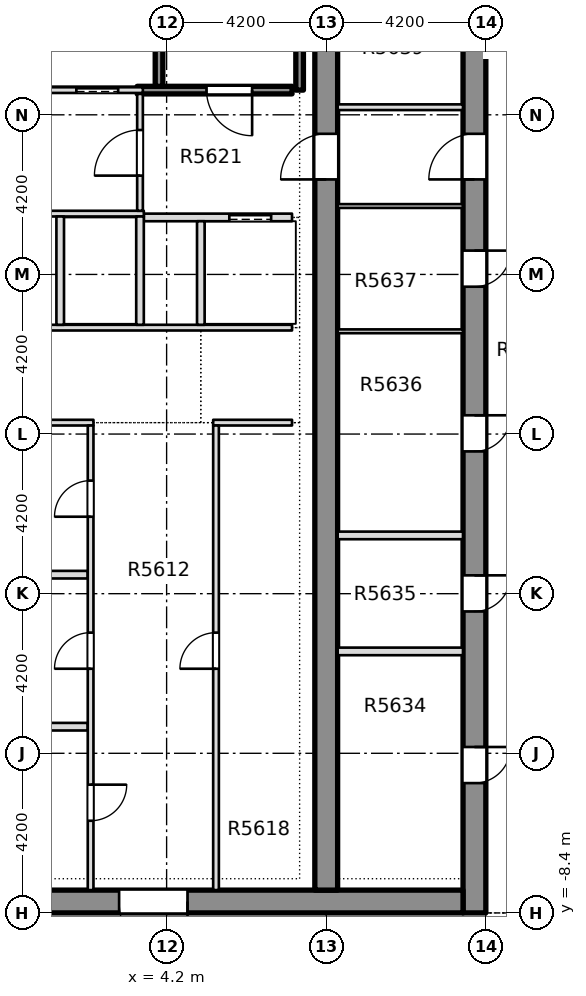
"""IFC4 building model, lengths in metres.
Left out: names, types, materials, properties, quantities, classifications, styles, units other than length and angle.
Written with IfcOpenShell. Run it as: python <this file> out.ifc"""

import sys

from ifc_helpers import new_model, si_unit, direction, frame, frame_2d, origin, place, context, subcontext, project, spatial, rectangle, extrude, element, fill, save


model = new_model("IFC4")
c1 = context("Model", 3, precision=1e-05, world=origin(), true_north=direction((0.0, 1.0)))
c2 = subcontext(c1, "Body", "Model", "MODEL_VIEW")
j1 = project(units=[si_unit("LENGTHUNIT", "METRE"), si_unit("PLANEANGLEUNIT", "RADIAN")], contexts=[c1])
p1 = place(None, origin())
s1 = spatial("IfcSite", under=j1, at=p1, CompositionType="ELEMENT")
p2 = place(p1, origin())
s2 = spatial("IfcBuilding", under=s1, at=p2, CompositionType="ELEMENT")
p3 = place(p2, frame((0.0, 0.0, 213.5)))
s3 = spatial("IfcBuildingStorey", under=s2, at=p3, CompositionType="ELEMENT", Elevation=213.5)
p4 = place(p3, frame((12.3, -8.4, -0.4), z_axis=(0.0, 0.0, 1.0), x_axis=(0.0, 1.0, 0.0)))
e1 = element("IfcWall", 1, at=p4, inside=s3, PredefinedType="SHEAR", context=c2, shape_type="SweptSolid", body=[
    extrude(rectangle(XDim=30.15, YDim=0.6, at=frame_2d((15.075, 0.0))), origin(), (0.0, 0.0, 1.0), 3.4),
])
p5 = place(p4, frame((3.416, 0.0, 0.4)))
e2 = element("IfcOpeningElement", 2, at=p5, cuts=e1, PredefinedType="OPENING", context=c2, shape_type="SweptSolid", body=[
    extrude(rectangle(XDim=0.95, YDim=2.1, at=frame_2d((0.475, 1.05))), frame((0.0, 0.31, 0.0), z_axis=(0.0, -1.0, 0.0), x_axis=(1.0, 0.0, 0.0)), (0.0, 0.0, 1.0), 0.62),
])
p6 = place(p4, frame((7.932, 0.0, 0.4)))
e3 = element("IfcOpeningElement", 3, at=p6, cuts=e1, PredefinedType="OPENING", context=c2, shape_type="SweptSolid", body=[
    extrude(rectangle(XDim=0.95, YDim=2.1, at=frame_2d((0.475, 1.05))), frame((0.0, 0.31, 0.0), z_axis=(0.0, -1.0, 0.0), x_axis=(1.0, 0.0, 0.0)), (0.0, 0.0, 1.0), 0.62),
])
p7 = place(p4, frame((12.144, 0.0, 0.4)))
e4 = element("IfcOpeningElement", 4, at=p7, cuts=e1, PredefinedType="OPENING", context=c2, shape_type="SweptSolid", body=[
    extrude(rectangle(XDim=0.95, YDim=2.1, at=frame_2d((0.475, 1.05))), frame((0.0, 0.31, 0.0), z_axis=(0.0, -1.0, 0.0), x_axis=(1.0, 0.0, 0.0)), (0.0, 0.0, 1.0), 0.62),
])
p8 = place(p4, frame((16.477, 0.0, 0.4)))
e5 = element("IfcOpeningElement", 5, at=p8, cuts=e1, PredefinedType="OPENING", context=c2, shape_type="SweptSolid", body=[
    extrude(rectangle(XDim=0.95, YDim=2.1, at=frame_2d((0.475, 1.05))), frame((0.0, 0.31, 0.0), z_axis=(0.0, -1.0, 0.0), x_axis=(1.0, 0.0, 0.0)), (0.0, 0.0, 1.0), 0.62),
])
p9 = place(p4, frame((23.605, 0.0, 0.4)))
e6 = element("IfcOpeningElement", 6, at=p9, cuts=e1, PredefinedType="OPENING", context=c2, shape_type="SweptSolid", body=[
    extrude(rectangle(XDim=0.95, YDim=2.1, at=frame_2d((0.475, 1.05))), frame((0.0, 0.31, 0.0), z_axis=(0.0, -1.0, 0.0), x_axis=(1.0, 0.0, 0.0)), (0.0, 0.0, 1.0), 0.62),
])
p10 = place(p4, frame((27.63, 0.0, 0.4)))
e7 = element("IfcOpeningElement", 7, at=p10, cuts=e1, PredefinedType="OPENING", context=c2, shape_type="SweptSolid", body=[
    extrude(rectangle(XDim=0.95, YDim=2.1, at=frame_2d((0.475, 1.05))), frame((0.0, 0.31, 0.0), z_axis=(0.0, -1.0, 0.0), x_axis=(1.0, 0.0, 0.0)), (0.0, 0.0, 1.0), 0.62),
])
p11 = place(p4, frame((19.3, 0.0, 0.4)))
e8 = element("IfcOpeningElement", 8, at=p11, cuts=e1, PredefinedType="OPENING", context=c2, shape_type="SweptSolid", body=[
    extrude(rectangle(XDim=1.2, YDim=2.1, at=frame_2d((0.6, 1.05))), frame((0.0, 0.31, 0.0), z_axis=(0.0, -1.0, 0.0), x_axis=(1.0, 0.0, 0.0)), (0.0, 0.0, 1.0), 0.62),
])
p12 = place(p3, frame((-12.0, -8.1, -0.4), z_axis=(0.0, 0.0, 1.0), x_axis=(1.0, 0.0, 0.0)))
e9 = element("IfcWall", 9, at=p12, inside=s3, PredefinedType="SHEAR", context=c2, shape_type="SweptSolid", body=[
    extrude(rectangle(XDim=24.0, YDim=0.6, at=frame_2d((12.0, 0.0))), origin(), (0.0, 0.0, 1.0), 3.4),
])
p13 = place(p12, frame((7.25, 0.0, 0.4)))
e10 = element("IfcOpeningElement", 10, at=p13, cuts=e9, PredefinedType="OPENING", context=c2, shape_type="SweptSolid", body=[
    extrude(rectangle(XDim=1.8, YDim=2.1, at=frame_2d((0.9, 1.05))), frame((0.0, 0.31, 0.0), z_axis=(0.0, -1.0, 0.0), x_axis=(1.0, 0.0, 0.0)), (0.0, 0.0, 1.0), 0.62),
])
p14 = place(p12, frame((14.95, 0.0, 0.4)))
e11 = element("IfcOpeningElement", 11, at=p14, cuts=e9, PredefinedType="OPENING", context=c2, shape_type="SweptSolid", body=[
    extrude(rectangle(XDim=1.8, YDim=2.1, at=frame_2d((0.9, 1.05))), frame((0.0, 0.31, 0.0), z_axis=(0.0, -1.0, 0.0), x_axis=(1.0, 0.0, 0.0)), (0.0, 0.0, 1.0), 0.62),
])
p15 = place(p3, frame((8.4, -7.8, -0.4), z_axis=(0.0, 0.0, 1.0), x_axis=(0.0, 1.0, 0.0)))
e12 = element("IfcWall", 12, at=p15, inside=s3, PredefinedType="SHEAR", context=c2, shape_type="SweptSolid", body=[
    extrude(rectangle(XDim=28.95, YDim=0.6, at=frame_2d((14.475, 0.0))), origin(), (0.0, 0.0, 1.0), 3.4),
])
p16 = place(p15, frame((18.7, 0.0, 0.4)))
e13 = element("IfcOpeningElement", 13, at=p16, cuts=e12, PredefinedType="OPENING", context=c2, shape_type="SweptSolid", body=[
    extrude(rectangle(XDim=1.2, YDim=2.1, at=frame_2d((0.6, 1.05))), frame((0.0, 0.31, 0.0), z_axis=(0.0, -1.0, 0.0), x_axis=(1.0, 0.0, 0.0)), (0.0, 0.0, 1.0), 0.62),
])
for number, where, z_axis, x_axis in (
    (14, (0.1, -3.5, 0.0), (0.0, 0.0, 1.0), (1.0, 0.0, 0.0)),
    (15, (0.1, 0.5, 0.0), (0.0, 0.0, 1.0), (1.0, 0.0, 0.0)),
):
    element("IfcWall", number, at=place(p3, frame(where, z_axis=z_axis, x_axis=x_axis)), inside=s3, PredefinedType="PARTITIONING", context=c2, shape_type="SweptSolid", body=[
        extrude(rectangle(XDim=2.025, YDim=0.2, at=frame_2d((1.012, 0.0))), origin(), (0.0, 0.0, 1.0), 3.0),
    ])
p17 = place(p3, frame((-2.275, 4.5, 0.0), z_axis=(0.0, 0.0, 1.0), x_axis=(1.0, 0.0, 0.0)))
e16 = element("IfcWall", 16, at=p17, inside=s3, PredefinedType="PARTITIONING", context=c2, shape_type="SweptSolid", body=[
    extrude(rectangle(XDim=4.55, YDim=0.15, at=frame_2d((2.275, 0.0))), origin(), (0.0, 0.0, 1.0), 3.0),
])
p18 = place(p3, frame((5.425, 4.5, 0.0), z_axis=(0.0, 0.0, 1.0), x_axis=(1.0, 0.0, 0.0)))
e17 = element("IfcWall", 17, at=p18, inside=s3, PredefinedType="PARTITIONING", context=c2, shape_type="SweptSolid", body=[
    extrude(rectangle(XDim=2.075, YDim=0.15, at=frame_2d((1.038, 0.0))), origin(), (0.0, 0.0, 1.0), 3.0),
])
p19 = place(p3, frame((-7.5, 7.0, 0.0), z_axis=(0.0, 0.0, 1.0), x_axis=(1.0, 0.0, 0.0)))
e18 = element("IfcWall", 18, at=p19, inside=s3, PredefinedType="PARTITIONING", context=c2, shape_type="SweptSolid", body=[
    extrude(rectangle(XDim=15.0, YDim=0.15, at=frame_2d((7.5, 0.0))), origin(), (0.0, 0.0, 1.0), 3.0),
])
p20 = place(p19, frame((6.8, 0.0, 0.0)))
e19 = element("IfcOpeningElement", 19, at=p20, cuts=e18, PredefinedType="OPENING", context=c2, shape_type="SweptSolid", body=[
    extrude(rectangle(XDim=1.4, YDim=2.1, at=frame_2d((0.7, 1.05))), frame((0.0, 0.085, 0.0), z_axis=(0.0, -1.0, 0.0), x_axis=(1.0, 0.0, 0.0)), (0.0, 0.0, 1.0), 0.17),
])
p21 = place(p3, frame((3.6, 9.9, 0.0), z_axis=(0.0, 0.0, 1.0), x_axis=(1.0, 0.0, 0.0)))
e20 = element("IfcWall", 20, at=p21, inside=s3, PredefinedType="PARTITIONING", context=c2, shape_type="SweptSolid", body=[
    extrude(rectangle(XDim=3.9, YDim=0.2, at=frame_2d((1.95, 0.0))), origin(), (0.0, 0.0, 1.0), 3.0),
])
p22 = place(p21, frame((2.25, 0.0, 0.0)))
e21 = element("IfcOpeningElement", 21, at=p22, cuts=e20, PredefinedType="OPENING", context=c2, shape_type="SweptSolid", body=[
    extrude(rectangle(XDim=1.1, YDim=2.1, at=frame_2d((0.55, 1.05))), frame((0.0, 0.11, 0.0), z_axis=(0.0, -1.0, 0.0), x_axis=(1.0, 0.0, 0.0)), (0.0, 0.0, 1.0), 0.22),
])
p23 = place(p3, frame((-3.6, 10.0, 0.0), z_axis=(0.0, 0.0, 1.0), x_axis=(1.0, 0.0, 0.0)))
e22 = element("IfcWall", 22, at=p23, inside=s3, PredefinedType="PARTITIONING", context=c2, shape_type="SweptSolid", body=[
    extrude(rectangle(XDim=7.2, YDim=0.15, at=frame_2d((3.6, 0.0))), origin(), (0.0, 0.0, 1.0), 3.0),
])
p24 = place(p23, frame((2.9, 0.0, 0.0)))
e23 = element("IfcOpeningElement", 23, at=p24, cuts=e22, PredefinedType="OPENING", context=c2, shape_type="SweptSolid", body=[
    extrude(rectangle(XDim=1.4, YDim=2.1, at=frame_2d((0.7, 1.05))), frame((0.0, 0.085, 0.0), z_axis=(0.0, -1.0, 0.0), x_axis=(1.0, 0.0, 0.0)), (0.0, 0.0, 1.0), 0.17),
])
p25 = place(p3, frame((-3.575, 13.25, 0.0), z_axis=(0.0, 0.0, 1.0), x_axis=(1.0, 0.0, 0.0)))
e24 = element("IfcWall", 24, at=p25, inside=s3, PredefinedType="PARTITIONING", context=c2, shape_type="SweptSolid", body=[
    extrude(rectangle(XDim=7.15, YDim=0.15, at=frame_2d((3.575, 0.0))), origin(), (0.0, 0.0, 1.0), 3.0),
])
p26 = place(p25, frame((0.6, 0.0, 0.0)))
e25 = element("IfcOpeningElement", 25, at=p26, cuts=e24, PredefinedType="OPENING", context=c2, shape_type="SweptSolid", body=[
    extrude(rectangle(XDim=1.2, YDim=2.1, at=frame_2d((0.6, 1.05))), frame((0.0, 0.085, 0.0), z_axis=(0.0, -1.0, 0.0), x_axis=(1.0, 0.0, 0.0)), (0.0, 0.0, 1.0), 0.17),
])
p27 = place(p25, frame((5.4, 0.0, 0.0)))
e26 = element("IfcOpeningElement", 26, at=p27, cuts=e24, PredefinedType="OPENING", context=c2, shape_type="SweptSolid", body=[
    extrude(rectangle(XDim=1.1, YDim=2.1, at=frame_2d((0.55, 1.05))), frame((0.0, 0.085, 0.0), z_axis=(0.0, -1.0, 0.0), x_axis=(1.0, 0.0, 0.0)), (0.0, 0.0, 1.0), 0.17),
])
p28 = place(p25, frame((2.975, 0.0, 0.0)))
e27 = element("IfcOpeningElement", 27, at=p28, cuts=e24, PredefinedType="OPENING", context=c2, shape_type="SweptSolid", body=[
    extrude(rectangle(XDim=1.2, YDim=2.1, at=frame_2d((0.6, 1.05))), frame((0.0, 0.085, 0.0), z_axis=(0.0, -1.0, 0.0), x_axis=(1.0, 0.0, 0.0)), (0.0, 0.0, 1.0), 0.17),
])
p29 = place(p3, frame((3.425, 13.25, 0.0), z_axis=(0.0, 0.0, 1.0), x_axis=(1.0, 0.0, 0.0)))
e28 = element("IfcWall", 28, at=p29, inside=s3, PredefinedType="SOLIDWALL", context=c2, shape_type="SweptSolid", body=[
    extrude(rectangle(XDim=4.075, YDim=0.2, at=frame_2d((2.038, 0.0))), origin(), (0.0, 0.0, 1.0), 3.0),
])
p30 = place(p29, frame((1.825, 0.0, 0.0)))
e29 = element("IfcOpeningElement", 29, at=p30, cuts=e28, PredefinedType="OPENING", context=c2, shape_type="SweptSolid", body=[
    extrude(rectangle(XDim=1.2, YDim=2.1, at=frame_2d((0.6, 1.05))), frame((0.0, 0.11, 0.0), z_axis=(0.0, -1.0, 0.0), x_axis=(1.0, 0.0, 0.0)), (0.0, 0.0, 1.0), 0.22),
])
p31 = place(p3, frame((1.4, 7.075, 0.0), z_axis=(0.0, 0.0, 1.0), x_axis=(0.0, 1.0, 0.0)))
e30 = element("IfcWall", 30, at=p31, inside=s3, PredefinedType="PARTITIONING", context=c2, shape_type="SweptSolid", body=[
    extrude(rectangle(XDim=2.85, YDim=0.2, at=frame_2d((1.425, 0.0))), origin(), (0.0, 0.0, 1.0), 3.0),
])
p32 = place(p3, frame((2.2, -7.799, 0.0), z_axis=(0.0, 0.0, 1.0), x_axis=(0.0, 1.0, 0.0)))
e31 = element("IfcWall", 31, at=p32, inside=s3, PredefinedType="PARTITIONING", context=c2, shape_type="SweptSolid", body=[
    extrude(rectangle(XDim=12.224, YDim=0.15, at=frame_2d((6.112, 0.0))), origin(), (0.0, 0.0, 1.0), 3.0),
])
p33 = place(p32, frame((1.824, 0.0, 0.0)))
e32 = element("IfcOpeningElement", 32, at=p33, cuts=e31, PredefinedType="OPENING", context=c2, shape_type="SweptSolid", body=[
    extrude(rectangle(XDim=0.95, YDim=2.1, at=frame_2d((0.475, 1.05))), frame((0.0, 0.085, 0.0), z_axis=(0.0, -1.0, 0.0), x_axis=(1.0, 0.0, 0.0)), (0.0, 0.0, 1.0), 0.17),
])
p34 = place(p32, frame((5.824, 0.0, 0.0)))
e33 = element("IfcOpeningElement", 33, at=p34, cuts=e31, PredefinedType="OPENING", context=c2, shape_type="SweptSolid", body=[
    extrude(rectangle(XDim=0.95, YDim=2.1, at=frame_2d((0.475, 1.05))), frame((0.0, 0.085, 0.0), z_axis=(0.0, -1.0, 0.0), x_axis=(1.0, 0.0, 0.0)), (0.0, 0.0, 1.0), 0.17),
])
p35 = place(p32, frame((9.824, 0.0, 0.0)))
e34 = element("IfcOpeningElement", 34, at=p35, cuts=e31, PredefinedType="OPENING", context=c2, shape_type="SweptSolid", body=[
    extrude(rectangle(XDim=0.95, YDim=2.1, at=frame_2d((0.475, 1.05))), frame((0.0, 0.085, 0.0), z_axis=(0.0, -1.0, 0.0), x_axis=(1.0, 0.0, 0.0)), (0.0, 0.0, 1.0), 0.17),
])
p36 = place(p3, frame((3.5, 7.075, 0.0), z_axis=(0.0, 0.0, 1.0), x_axis=(0.0, 1.0, 0.0)))
e35 = element("IfcWall", 35, at=p36, inside=s3, PredefinedType="PARTITIONING", context=c2, shape_type="SweptSolid", body=[
    extrude(rectangle(XDim=2.85, YDim=0.2, at=frame_2d((1.425, 0.0))), origin(), (0.0, 0.0, 1.0), 3.0),
])
p37 = place(p3, frame((3.5, 10.075, 0.0), z_axis=(0.0, 0.0, 1.0), x_axis=(0.0, 1.0, 0.0)))
e36 = element("IfcWall", 36, at=p37, inside=s3, PredefinedType="PARTITIONING", context=c2, shape_type="SweptSolid", body=[
    extrude(rectangle(XDim=3.075, YDim=0.15, at=frame_2d((1.538, 0.0))), origin(), (0.0, 0.0, 1.0), 3.0),
])
p38 = place(p37, frame((0.925, 0.0, 0.0)))
e37 = element("IfcOpeningElement", 37, at=p38, cuts=e36, PredefinedType="OPENING", context=c2, shape_type="SweptSolid", body=[
    extrude(rectangle(XDim=1.2, YDim=2.1, at=frame_2d((0.6, 1.05))), frame((0.0, 0.085, 0.0), z_axis=(0.0, -1.0, 0.0), x_axis=(1.0, 0.0, 0.0)), (0.0, 0.0, 1.0), 0.17),
])
p39 = place(p3, frame((4.0, 13.35, 0.0), z_axis=(0.0, 0.0, 1.0), x_axis=(0.0, 1.0, 0.0)))
e38 = element("IfcWall", 38, at=p39, inside=s3, PredefinedType="SOLIDWALL", context=c2, shape_type="SweptSolid", body=[
    extrude(rectangle(XDim=2.6, YDim=0.2, at=frame_2d((1.3, 0.0))), origin(), (0.0, 0.0, 1.0), 3.0),
])
p40 = place(p3, frame((5.1, 7.075, 0.0), z_axis=(0.0, 0.0, 1.0), x_axis=(0.0, 1.0, 0.0)))
e39 = element("IfcWall", 39, at=p40, inside=s3, PredefinedType="PARTITIONING", context=c2, shape_type="SweptSolid", body=[
    extrude(rectangle(XDim=2.725, YDim=0.2, at=frame_2d((1.363, 0.0))), origin(), (0.0, 0.0, 1.0), 3.0),
])
p41 = place(p3, frame((5.5, -7.799, 0.0), z_axis=(0.0, 0.0, 1.0), x_axis=(0.0, 1.0, 0.0)))
e40 = element("IfcWall", 40, at=p41, inside=s3, PredefinedType="PARTITIONING", context=c2, shape_type="SweptSolid", body=[
    extrude(rectangle(XDim=12.224, YDim=0.15, at=frame_2d((6.112, 0.0))), origin(), (0.0, 0.0, 1.0), 3.0),
])
p42 = place(p41, frame((5.824, 0.0, 0.0)))
e41 = element("IfcOpeningElement", 41, at=p42, cuts=e40, PredefinedType="OPENING", context=c2, shape_type="SweptSolid", body=[
    extrude(rectangle(XDim=0.95, YDim=2.1, at=frame_2d((0.475, 1.05))), frame((0.0, 0.085, 0.0), z_axis=(0.0, -1.0, 0.0), x_axis=(1.0, 0.0, 0.0)), (0.0, 0.0, 1.0), 0.17),
])
for number, where, z_axis, x_axis in (
    (42, (8.701, -1.519, 0.0), (0.0, 0.0, 1.0), (1.0, 0.0, 0.0)),
    (43, (8.701, 1.533, 0.0), (0.0, 0.0, 1.0), (1.0, 0.0, 0.0)),
):
    element("IfcWall", number, at=place(p3, frame(where, z_axis=z_axis, x_axis=x_axis)), inside=s3, PredefinedType="PARTITIONING", context=c2, shape_type="SweptSolid", body=[
        extrude(rectangle(XDim=3.298, YDim=0.2, at=frame_2d((1.649, 0.0))), origin(), (0.0, 0.0, 1.0), 3.0),
    ])
for number, where, z_axis, x_axis in (
    (44, (8.701, 6.904, 0.0), (0.0, 0.0, 1.0), (1.0, 0.0, 0.0)),
    (45, (8.701, 10.2, 0.0), (0.0, 0.0, 1.0), (1.0, 0.0, 0.0)),
):
    element("IfcWall", number, at=place(p3, frame(where, z_axis=z_axis, x_axis=x_axis)), inside=s3, PredefinedType="PARTITIONING", context=c2, shape_type="SweptSolid", body=[
        extrude(rectangle(XDim=3.298, YDim=0.1, at=frame_2d((1.649, 0.0))), origin(), (0.0, 0.0, 1.0), 3.0),
    ])
p43 = place(p3, frame((8.701, 12.8, 0.0), z_axis=(0.0, 0.0, 1.0), x_axis=(1.0, 0.0, 0.0)))
e46 = element("IfcWall", 46, at=p43, inside=s3, PredefinedType="PARTITIONING", context=c2, shape_type="SweptSolid", body=[
    extrude(rectangle(XDim=3.298, YDim=0.15, at=frame_2d((1.649, 0.0))), origin(), (0.0, 0.0, 1.0), 3.0),
])
p44 = place(p3, frame((7.7, 13.25, 0.0), z_axis=(0.0, 0.0, 1.0), x_axis=(0.0, 1.0, 0.0)))
e47 = element("IfcWall", 47, at=p44, inside=s3, PredefinedType="SOLIDWALL", context=c2, shape_type="SweptSolid", body=[
    extrude(rectangle(XDim=7.6, YDim=0.2, at=frame_2d((3.8, 0.0))), origin(), (0.0, 0.0, 1.0), 3.0),
])
p45 = place(p33, origin())
e48 = element("IfcDoor", 48, at=p45, inside=s3, OperationType="SINGLE_SWING_RIGHT", PredefinedType="DOOR", context=c2, shape_type="SweptSolid", body=[
    extrude(rectangle(XDim=0.95, YDim=2.1, at=frame_2d((0.475, 1.05))), frame((0.0, 0.025, 0.0), z_axis=(0.0, -1.0, 0.0), x_axis=(1.0, 0.0, 0.0)), (0.0, 0.0, 1.0), 0.05),
])
fill(e32, e48)
p46 = place(p34, origin())
e49 = element("IfcDoor", 49, at=p46, inside=s3, OperationType="SINGLE_SWING_RIGHT", PredefinedType="DOOR", context=c2, shape_type="SweptSolid", body=[
    extrude(rectangle(XDim=0.95, YDim=2.1, at=frame_2d((0.475, 1.05))), frame((0.0, 0.025, 0.0), z_axis=(0.0, -1.0, 0.0), x_axis=(1.0, 0.0, 0.0)), (0.0, 0.0, 1.0), 0.05),
])
fill(e33, e49)
p47 = place(p35, origin())
e50 = element("IfcDoor", 50, at=p47, inside=s3, OperationType="SINGLE_SWING_LEFT", PredefinedType="DOOR", context=c2, shape_type="SweptSolid", body=[
    extrude(rectangle(XDim=0.95, YDim=2.1, at=frame_2d((0.475, 1.05))), frame((0.0, 0.025, 0.0), z_axis=(0.0, -1.0, 0.0), x_axis=(1.0, 0.0, 0.0)), (0.0, 0.0, 1.0), 0.05),
])
fill(e34, e50)
p48 = place(p42, origin())
e51 = element("IfcDoor", 51, at=p48, inside=s3, OperationType="SINGLE_SWING_LEFT", PredefinedType="DOOR", context=c2, shape_type="SweptSolid", body=[
    extrude(rectangle(XDim=0.95, YDim=2.1, at=frame_2d((0.475, 1.05))), frame((0.0, 0.025, 0.0), z_axis=(0.0, -1.0, 0.0), x_axis=(1.0, 0.0, 0.0)), (0.0, 0.0, 1.0), 0.05),
])
fill(e41, e51)
p49 = place(p30, origin())
e52 = element("IfcDoor", 52, at=p49, inside=s3, OperationType="SINGLE_SWING_RIGHT", PredefinedType="DOOR", context=c2, shape_type="SweptSolid", body=[
    extrude(rectangle(XDim=1.2, YDim=2.1, at=frame_2d((0.6, 1.05))), frame((0.0, 0.025, 0.0), z_axis=(0.0, -1.0, 0.0), x_axis=(1.0, 0.0, 0.0)), (0.0, 0.0, 1.0), 0.05),
])
fill(e29, e52)
p50 = place(p22, origin())
e53 = element("IfcDoor", 53, at=p50, inside=s3, OperationType="SLIDING_TO_LEFT", PredefinedType="DOOR", context=c2, shape_type="SweptSolid", body=[
    extrude(rectangle(XDim=1.1, YDim=2.1, at=frame_2d((0.55, 1.05))), frame((0.0, 0.025, 0.0), z_axis=(0.0, -1.0, 0.0), x_axis=(1.0, 0.0, 0.0)), (0.0, 0.0, 1.0), 0.05),
])
fill(e21, e53)
p51 = place(p27, origin())
e54 = element("IfcDoor", 54, at=p51, inside=s3, OperationType="SLIDING_TO_LEFT", PredefinedType="DOOR", context=c2, shape_type="SweptSolid", body=[
    extrude(rectangle(XDim=1.1, YDim=2.1, at=frame_2d((0.55, 1.05))), frame((0.0, 0.025, 0.0), z_axis=(0.0, -1.0, 0.0), x_axis=(1.0, 0.0, 0.0)), (0.0, 0.0, 1.0), 0.05),
])
fill(e26, e54)
p52 = place(p38, origin())
e55 = element("IfcDoor", 55, at=p52, inside=s3, OperationType="SINGLE_SWING_LEFT", PredefinedType="DOOR", context=c2, shape_type="SweptSolid", body=[
    extrude(rectangle(XDim=1.2, YDim=2.1, at=frame_2d((0.6, 1.05))), frame((0.0, 0.025, 0.0), z_axis=(0.0, -1.0, 0.0), x_axis=(1.0, 0.0, 0.0)), (0.0, 0.0, 1.0), 0.05),
])
fill(e37, e55)
p53 = place(p14, origin())
e56 = element("IfcDoor", 56, at=p53, inside=s3, OperationType="SINGLE_SWING_LEFT", PredefinedType="DOOR", context=c2, shape_type="SweptSolid", body=[
    extrude(rectangle(XDim=1.8, YDim=2.1, at=frame_2d((0.9, 1.05))), frame((0.0, 0.025, 0.0), z_axis=(0.0, -1.0, 0.0), x_axis=(1.0, 0.0, 0.0)), (0.0, 0.0, 1.0), 0.05),
])
fill(e11, e56)
p54 = place(p5, origin())
e57 = element("IfcDoor", 57, at=p54, inside=s3, OperationType="SINGLE_SWING_LEFT", PredefinedType="DOOR", context=c2, shape_type="SweptSolid", body=[
    extrude(rectangle(XDim=0.95, YDim=2.1, at=frame_2d((0.475, 1.05))), frame((0.0, 0.025, 0.0), z_axis=(0.0, -1.0, 0.0), x_axis=(1.0, 0.0, 0.0)), (0.0, 0.0, 1.0), 0.05),
])
fill(e2, e57)
p55 = place(p6, origin())
e58 = element("IfcDoor", 58, at=p55, inside=s3, OperationType="SINGLE_SWING_LEFT", PredefinedType="DOOR", context=c2, shape_type="SweptSolid", body=[
    extrude(rectangle(XDim=0.95, YDim=2.1, at=frame_2d((0.475, 1.05))), frame((0.0, 0.025, 0.0), z_axis=(0.0, -1.0, 0.0), x_axis=(1.0, 0.0, 0.0)), (0.0, 0.0, 1.0), 0.05),
])
fill(e3, e58)
p56 = place(p7, origin())
e59 = element("IfcDoor", 59, at=p56, inside=s3, OperationType="SINGLE_SWING_LEFT", PredefinedType="DOOR", context=c2, shape_type="SweptSolid", body=[
    extrude(rectangle(XDim=0.95, YDim=2.1, at=frame_2d((0.475, 1.05))), frame((0.0, 0.025, 0.0), z_axis=(0.0, -1.0, 0.0), x_axis=(1.0, 0.0, 0.0)), (0.0, 0.0, 1.0), 0.05),
])
fill(e4, e59)
p57 = place(p8, origin())
e60 = element("IfcDoor", 60, at=p57, inside=s3, OperationType="SINGLE_SWING_LEFT", PredefinedType="DOOR", context=c2, shape_type="SweptSolid", body=[
    extrude(rectangle(XDim=0.95, YDim=2.1, at=frame_2d((0.475, 1.05))), frame((0.0, 0.025, 0.0), z_axis=(0.0, -1.0, 0.0), x_axis=(1.0, 0.0, 0.0)), (0.0, 0.0, 1.0), 0.05),
])
fill(e5, e60)
p58 = place(p11, origin())
e61 = element("IfcDoor", 61, at=p58, inside=s3, OperationType="SINGLE_SWING_LEFT", PredefinedType="DOOR", context=c2, shape_type="SweptSolid", body=[
    extrude(rectangle(XDim=1.2, YDim=2.1, at=frame_2d((0.6, 1.05))), frame((0.0, 0.025, 0.0), z_axis=(0.0, -1.0, 0.0), x_axis=(1.0, 0.0, 0.0)), (0.0, 0.0, 1.0), 0.05),
])
fill(e8, e61)
p59 = place(p16, origin())
e62 = element("IfcDoor", 62, at=p59, inside=s3, OperationType="SINGLE_SWING_LEFT", PredefinedType="DOOR", context=c2, shape_type="SweptSolid", body=[
    extrude(rectangle(XDim=1.2, YDim=2.1, at=frame_2d((0.6, 1.05))), frame((0.0, 0.025, 0.0), z_axis=(0.0, -1.0, 0.0), x_axis=(1.0, 0.0, 0.0)), (0.0, 0.0, 1.0), 0.05),
])
fill(e13, e62)
save(model, sys.argv[1])
